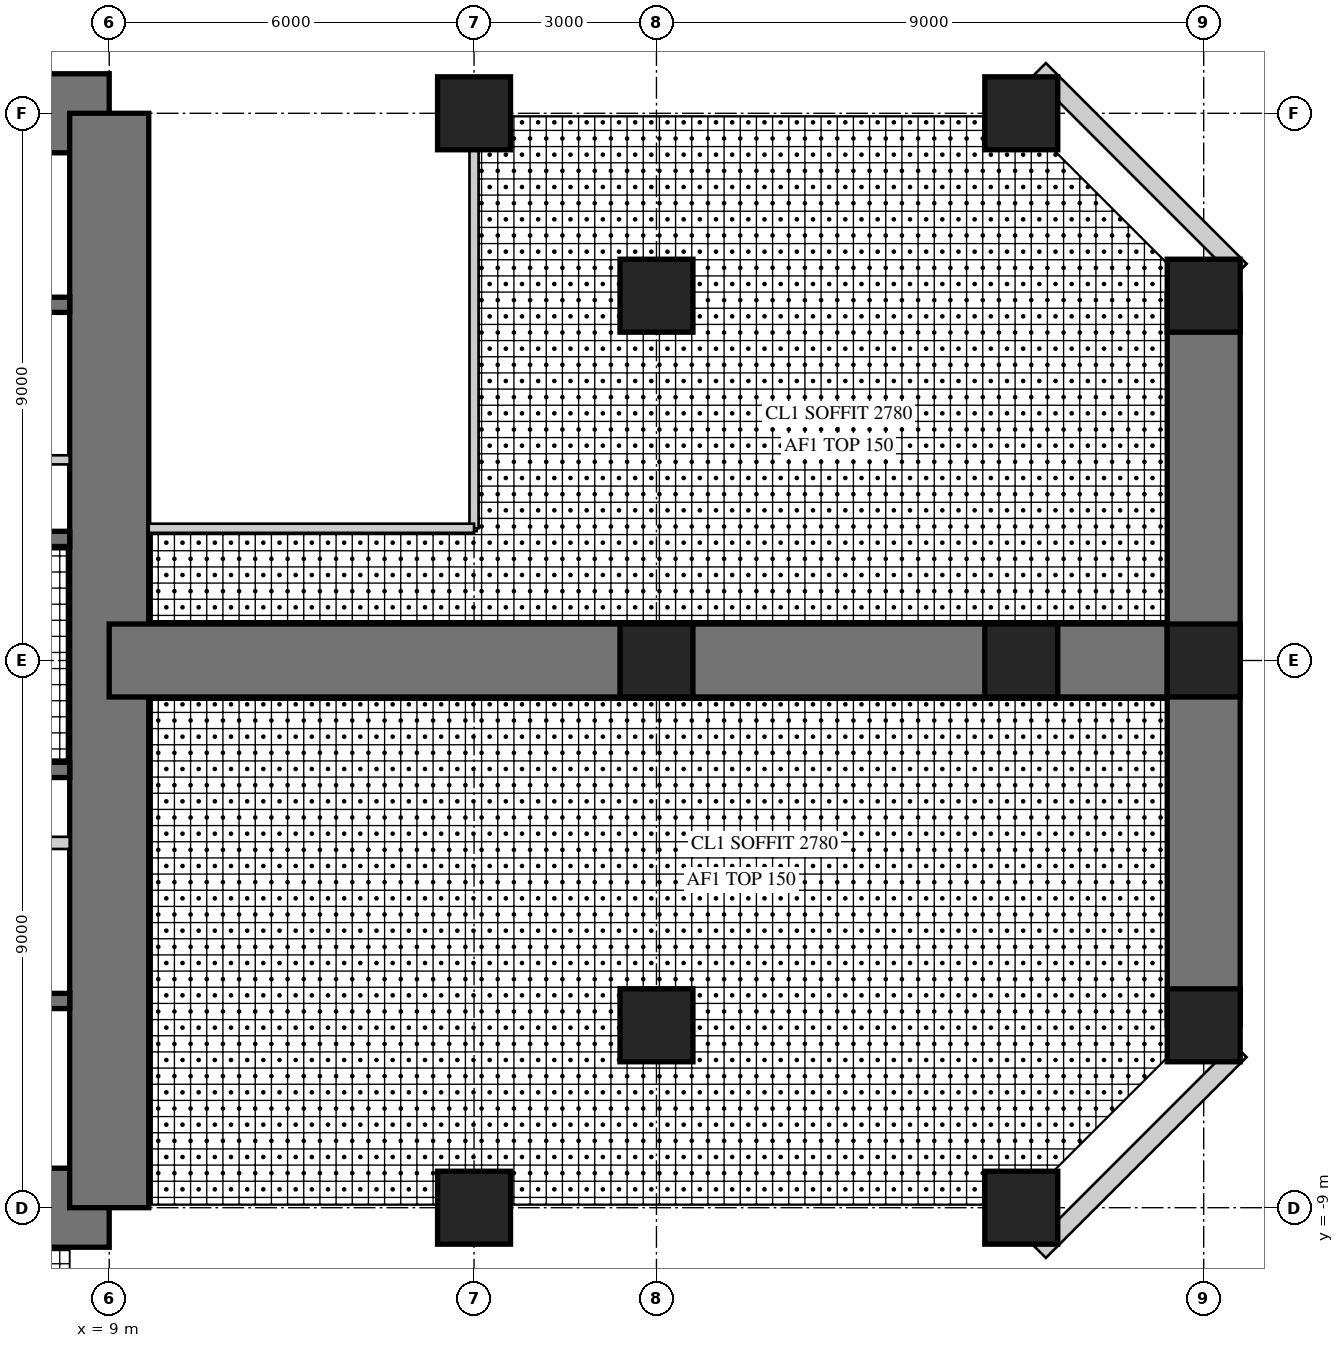
"""IFC4 building model, lengths in metres.
Left out: names, types, materials, properties, quantities, classifications, styles, units other than length and angle.
Written with IfcOpenShell. Run it as: python <this file> out.ifc"""

import sys

from ifc_helpers import new_model, si_unit, direction, frame, frame_2d, origin, origin_2d, place, context, subcontext, project, spatial, rectangle, hollow_rectangle, extrude, element, fill, save


model = new_model("IFC4")
c1 = context("Model", 3, precision=1e-05, world=origin(), true_north=direction((0.0, 1.0)))
c2 = subcontext(c1, "Body", "Model", "MODEL_VIEW")
j1 = project(units=[si_unit("LENGTHUNIT", "METRE"), si_unit("PLANEANGLEUNIT", "RADIAN")], contexts=[c1])
p1 = place(None, origin())
s1 = spatial("IfcSite", under=j1, at=p1, CompositionType="ELEMENT")
p2 = place(p1, origin())
s2 = spatial("IfcBuilding", under=s1, at=p2, CompositionType="ELEMENT")
p3 = place(p2, frame((0.0, 0.0, 71.5)))
s3 = spatial("IfcBuildingStorey", under=s2, at=p3, CompositionType="ELEMENT", Elevation=71.5)
p4 = place(p3, frame((9.0, 9.0, 0.0), z_axis=(0.0, 0.0, 1.0), x_axis=(-1.0, 0.0, 0.0)))
e1 = element("IfcWall", 1, at=p4, inside=s3, PredefinedType="SHEAR", context=c2, shape_type="SweptSolid", body=[
    extrude(rectangle(XDim=18.0, YDim=1.3, at=frame_2d((9.0, 0.0))), origin(), (0.0, 0.0, 1.0), 4.0),
])
p5 = place(p4, frame((9.8, 0.0, 0.0)))
e2 = element("IfcOpeningElement", 2, at=p5, cuts=e1, PredefinedType="OPENING", context=c2, shape_type="SweptSolid", body=[
    extrude(rectangle(XDim=1.0, YDim=2.4, at=frame_2d((0.5, 1.2))), frame((0.0, 0.66, 0.0), z_axis=(0.0, -1.0, 0.0), x_axis=(1.0, 0.0, 0.0)), (0.0, 0.0, 1.0), 1.32),
])
p6 = place(p3, frame((-9.0, -9.0, 0.0), z_axis=(0.0, 0.0, 1.0), x_axis=(1.0, 0.0, 0.0)))
e3 = element("IfcWall", 3, at=p6, inside=s3, PredefinedType="SHEAR", context=c2, shape_type="SweptSolid", body=[
    extrude(rectangle(XDim=18.0, YDim=1.3, at=frame_2d((9.0, 0.0))), origin(), (0.0, 0.0, 1.0), 4.0),
])
p7 = place(p6, frame((9.8, 0.0, 0.0)))
e4 = element("IfcOpeningElement", 4, at=p7, cuts=e3, PredefinedType="OPENING", context=c2, shape_type="SweptSolid", body=[
    extrude(rectangle(XDim=1.0, YDim=2.4, at=frame_2d((0.5, 1.2))), frame((0.0, 0.66, 0.0), z_axis=(0.0, -1.0, 0.0), x_axis=(1.0, 0.0, 0.0)), (0.0, 0.0, 1.0), 1.32),
])
p8 = place(p3, frame((9.0, -9.0, 0.0), z_axis=(0.0, 0.0, 1.0), x_axis=(0.0, 1.0, 0.0)))
e5 = element("IfcWall", 5, at=p8, inside=s3, PredefinedType="SHEAR", context=c2, shape_type="SweptSolid", body=[
    extrude(rectangle(XDim=18.0, YDim=1.3, at=frame_2d((9.0, 0.0))), origin(), (0.0, 0.0, 1.0), 4.0),
])
p9 = place(p8, frame((9.8, 0.0, 0.0)))
e6 = element("IfcOpeningElement", 6, at=p9, cuts=e5, PredefinedType="OPENING", context=c2, shape_type="SweptSolid", body=[
    extrude(rectangle(XDim=1.0, YDim=2.4, at=frame_2d((0.5, 1.2))), frame((0.0, 0.66, 0.0), z_axis=(0.0, -1.0, 0.0), x_axis=(1.0, 0.0, 0.0)), (0.0, 0.0, 1.0), 1.32),
])
p10 = place(p3, frame((1.925, 2.0, 0.0), z_axis=(0.0, 0.0, 1.0), x_axis=(1.0, 0.0, 0.0)))
e7 = element("IfcWall", 7, at=p10, inside=s3, PredefinedType="SHEAR", context=c2, shape_type="SweptSolid", body=[
    extrude(rectangle(XDim=6.425, YDim=0.25, at=frame_2d((3.212, 0.0))), origin(), (0.0, 0.0, 1.0), 4.0),
])
p11 = place(p3, frame((1.925, 5.85, 0.0), z_axis=(0.0, 0.0, 1.0), x_axis=(1.0, 0.0, 0.0)))
e8 = element("IfcWall", 8, at=p11, inside=s3, PredefinedType="SHEAR", context=c2, shape_type="SweptSolid", body=[
    extrude(rectangle(XDim=6.425, YDim=0.25, at=frame_2d((3.212, 0.0))), origin(), (0.0, 0.0, 1.0), 4.0),
])
p12 = place(p11, frame((0.454, 0.0, 0.0)))
e9 = element("IfcOpeningElement", 9, at=p12, cuts=e8, PredefinedType="OPENING", context=c2, shape_type="SweptSolid", body=[
    extrude(rectangle(XDim=1.1, YDim=2.2, at=frame_2d((0.55, 1.1))), frame((0.0, 0.135, 0.0), z_axis=(0.0, -1.0, 0.0), x_axis=(1.0, 0.0, 0.0)), (0.0, 0.0, 1.0), 0.27),
])
p13 = place(p11, frame((2.663, 0.0, 0.0)))
e10 = element("IfcOpeningElement", 10, at=p13, cuts=e8, PredefinedType="OPENING", context=c2, shape_type="SweptSolid", body=[
    extrude(rectangle(XDim=1.1, YDim=2.2, at=frame_2d((0.55, 1.1))), frame((0.0, 0.135, 0.0), z_axis=(0.0, -1.0, 0.0), x_axis=(1.0, 0.0, 0.0)), (0.0, 0.0, 1.0), 0.27),
])
p14 = place(p11, frame((4.871, 0.0, 0.0)))
e11 = element("IfcOpeningElement", 11, at=p14, cuts=e8, PredefinedType="OPENING", context=c2, shape_type="SweptSolid", body=[
    extrude(rectangle(XDim=1.1, YDim=2.2, at=frame_2d((0.55, 1.1))), frame((0.0, 0.135, 0.0), z_axis=(0.0, -1.0, 0.0), x_axis=(1.0, 0.0, 0.0)), (0.0, 0.0, 1.0), 0.27),
])
p15 = place(p3, frame((1.925, 3.3, 0.0), z_axis=(0.0, 0.0, 1.0), x_axis=(1.0, 0.0, 0.0)))
e12 = element("IfcWall", 12, at=p15, inside=s3, PredefinedType="PARTITIONING", context=c2, shape_type="SweptSolid", body=[
    extrude(rectangle(XDim=6.425, YDim=0.15, at=frame_2d((3.212, 0.0))), origin(), (0.0, 0.0, 1.0), 4.0),
])
p16 = place(p15, frame((0.075, 0.0, 0.0)))
e13 = element("IfcOpeningElement", 13, at=p16, cuts=e12, PredefinedType="OPENING", context=c2, shape_type="SweptSolid", body=[
    extrude(rectangle(XDim=0.8, YDim=2.1, at=frame_2d((0.4, 1.05))), frame((0.0, 0.085, 0.0), z_axis=(0.0, -1.0, 0.0), x_axis=(1.0, 0.0, 0.0)), (0.0, 0.0, 1.0), 0.17),
])
p17 = place(p15, frame((3.675, 0.0, 0.0)))
e14 = element("IfcOpeningElement", 14, at=p17, cuts=e12, PredefinedType="OPENING", context=c2, shape_type="SweptSolid", body=[
    extrude(rectangle(XDim=0.8, YDim=2.1, at=frame_2d((0.4, 1.05))), frame((0.0, 0.085, 0.0), z_axis=(0.0, -1.0, 0.0), x_axis=(1.0, 0.0, 0.0)), (0.0, 0.0, 1.0), 0.17),
])
p18 = place(p3, frame((2.125, -1.8, 0.0), z_axis=(0.0, 0.0, 1.0), x_axis=(1.0, 0.0, 0.0)))
e15 = element("IfcWall", 15, at=p18, inside=s3, PredefinedType="SHEAR", context=c2, shape_type="SweptSolid", body=[
    extrude(rectangle(XDim=6.225, YDim=0.25, at=frame_2d((3.113, 0.0))), origin(), (0.0, 0.0, 1.0), 4.0),
])
p19 = place(p3, frame((2.125, -5.6, 0.0), z_axis=(0.0, 0.0, 1.0), x_axis=(1.0, 0.0, 0.0)))
e16 = element("IfcWall", 16, at=p19, inside=s3, PredefinedType="SHEAR", context=c2, shape_type="SweptSolid", body=[
    extrude(rectangle(XDim=6.225, YDim=0.25, at=frame_2d((3.113, 0.0))), origin(), (0.0, 0.0, 1.0), 4.0),
])
p20 = place(p19, frame((0.175, 0.0, 0.0)))
e17 = element("IfcOpeningElement", 17, at=p20, cuts=e16, PredefinedType="OPENING", context=c2, shape_type="SweptSolid", body=[
    extrude(rectangle(XDim=1.0, YDim=2.1, at=frame_2d((0.5, 1.05))), frame((0.0, 0.135, 0.0), z_axis=(0.0, -1.0, 0.0), x_axis=(1.0, 0.0, 0.0)), (0.0, 0.0, 1.0), 0.27),
])
p21 = place(p3, frame((5.725, -3.0, 0.0), z_axis=(0.0, 0.0, 1.0), x_axis=(1.0, 0.0, 0.0)))
e18 = element("IfcWall", 18, at=p21, inside=s3, PredefinedType="PARTITIONING", context=c2, shape_type="SweptSolid", body=[
    extrude(rectangle(XDim=2.625, YDim=0.2, at=frame_2d((1.312, 0.0))), origin(), (0.0, 0.0, 1.0), 4.0),
])
p22 = place(p3, frame((9.0, 0.0, 0.0), z_axis=(0.0, 0.0, 1.0), x_axis=(1.0, 0.0, 0.0)))
e19 = element("IfcWall", 19, at=p22, inside=s3, PredefinedType="SHEAR", context=c2, shape_type="SweptSolid", body=[
    extrude(rectangle(XDim=18.0, YDim=1.2, at=frame_2d((9.0, 0.0))), origin(), (0.0, 0.0, 1.0), 4.0),
])
p23 = place(p22, frame((9.9, 0.0, 0.0)))
e20 = element("IfcOpeningElement", 20, at=p23, cuts=e19, PredefinedType="OPENING", context=c2, shape_type="SweptSolid", body=[
    extrude(rectangle(XDim=1.0, YDim=2.2, at=frame_2d((0.5, 1.1))), frame((0.0, 0.61, 0.0), z_axis=(0.0, -1.0, 0.0), x_axis=(1.0, 0.0, 0.0)), (0.0, 0.0, 1.0), 1.22),
])
p24 = place(p3, frame((27.0, -6.0, 0.0), z_axis=(0.0, 0.0, 1.0), x_axis=(0.0, 1.0, 0.0)))
e21 = element("IfcWall", 21, at=p24, inside=s3, PredefinedType="SHEAR", context=c2, shape_type="SweptSolid", body=[
    extrude(rectangle(XDim=12.0, YDim=1.2, at=frame_2d((6.0, 0.0))), origin(), (0.0, 0.0, 1.0), 4.0),
])
p25 = place(p24, frame((1.6, 0.0, 0.6)))
e22 = element("IfcOpeningElement", 22, at=p25, cuts=e21, PredefinedType="OPENING", context=c2, shape_type="SweptSolid", body=[
    extrude(rectangle(XDim=3.0, YDim=2.4, at=frame_2d((1.5, 1.2))), frame((0.0, 0.61, 0.0), z_axis=(0.0, -1.0, 0.0), x_axis=(1.0, 0.0, 0.0)), (0.0, 0.0, 1.0), 1.22),
])
p26 = place(p24, frame((7.4, 0.0, 0.6)))
e23 = element("IfcOpeningElement", 23, at=p26, cuts=e21, PredefinedType="OPENING", context=c2, shape_type="SweptSolid", body=[
    extrude(rectangle(XDim=3.0, YDim=2.4, at=frame_2d((1.5, 1.2))), frame((0.0, 0.61, 0.0), z_axis=(0.0, -1.0, 0.0), x_axis=(1.0, 0.0, 0.0)), (0.0, 0.0, 1.0), 1.22),
])
for number, where, z_axis, x_axis in (
    (24, (15.0, -9.0, 0.0), (0.0, 0.0, 1.0), (1.0, 0.0, 0.0)),
    (25, (24.0, -9.0, 0.0), (0.0, 0.0, 1.0), (1.0, 0.0, 0.0)),
    (26, (15.0, 9.0, 0.0), (0.0, 0.0, 1.0), (1.0, 0.0, 0.0)),
    (27, (24.0, 9.0, 0.0), (0.0, 0.0, 1.0), (1.0, 0.0, 0.0)),
    (28, (27.0, -6.0, 0.0), (0.0, 0.0, 1.0), (1.0, 0.0, 0.0)),
    (29, (27.0, 0.0, 0.0), (0.0, 0.0, 1.0), (1.0, 0.0, 0.0)),
    (30, (27.0, 6.0, 0.0), (0.0, 0.0, 1.0), (1.0, 0.0, 0.0)),
    (31, (18.0, -6.0, 0.0), (0.0, 0.0, 1.0), (1.0, 0.0, 0.0)),
    (32, (18.0, 0.0, 0.0), (0.0, 0.0, 1.0), (1.0, 0.0, 0.0)),
    (33, (18.0, 6.0, 0.0), (0.0, 0.0, 1.0), (1.0, 0.0, 0.0)),
    (34, (24.0, 0.0, 0.0), (0.0, 0.0, 1.0), (1.0, 0.0, 0.0)),
):
    element("IfcColumn", number, at=place(p3, frame(where, z_axis=z_axis, x_axis=x_axis)), inside=s3, PredefinedType="COLUMN", context=c2, shape_type="SweptSolid", body=[
        extrude(rectangle(XDim=1.2, YDim=1.2, at=origin_2d()), origin(), (0.0, 0.0, 1.0), 4.0),
    ])
p27 = place(p3, frame((24.298, -9.72, 0.0), z_axis=(0.0, 0.0, 1.0), x_axis=(0.707106781187, 0.707106781187, 0.0)))
e35 = element("IfcWall", 35, at=p27, inside=s3, PredefinedType="SOLIDWALL", context=c2, shape_type="SweptSolid", body=[
    extrude(rectangle(XDim=4.669, YDim=0.3, at=frame_2d((2.335, 0.0))), origin(), (0.0, 0.0, 1.0), 3.8),
])
p28 = place(p27, frame((1.885, 0.0, 0.3)))
e36 = element("IfcOpeningElement", 36, at=p28, cuts=e35, PredefinedType="OPENING", context=c2, shape_type="SweptSolid", body=[
    extrude(rectangle(XDim=0.9, YDim=2.4, at=frame_2d((0.45, 1.2))), frame((0.0, 0.16, 0.0), z_axis=(0.0, -1.0, 0.0), x_axis=(1.0, 0.0, 0.0)), (0.0, 0.0, 1.0), 0.32),
])
p29 = place(p3, frame((27.6, 6.418, 0.0), z_axis=(0.0, 0.0, 1.0), x_axis=(-0.707106781187, 0.707106781187, 0.0)))
e37 = element("IfcWall", 37, at=p29, inside=s3, PredefinedType="SOLIDWALL", context=c2, shape_type="SweptSolid", body=[
    extrude(rectangle(XDim=4.669, YDim=0.3, at=frame_2d((2.335, 0.0))), origin(), (0.0, 0.0, 1.0), 3.8),
])
p30 = place(p29, frame((1.885, 0.0, 0.3)))
e38 = element("IfcOpeningElement", 38, at=p30, cuts=e37, PredefinedType="OPENING", context=c2, shape_type="SweptSolid", body=[
    extrude(rectangle(XDim=0.9, YDim=2.4, at=frame_2d((0.45, 1.2))), frame((0.0, 0.16, 0.0), z_axis=(0.0, -1.0, 0.0), x_axis=(1.0, 0.0, 0.0)), (0.0, 0.0, 1.0), 0.32),
])
p31 = place(p3, frame((15.0, 2.175, 0.0), z_axis=(0.0, 0.0, 1.0), x_axis=(0.0, 1.0, 0.0)))
e39 = element("IfcWall", 39, at=p31, inside=s3, PredefinedType="PARTITIONING", context=c2, shape_type="SweptSolid", body=[
    extrude(rectangle(XDim=6.225, YDim=0.15, at=frame_2d((3.112, 0.0))), origin(), (0.0, 0.0, 1.0), 2.95),
])
p32 = place(p31, frame((2.613, 0.0, 0.0)))
e40 = element("IfcOpeningElement", 40, at=p32, cuts=e39, PredefinedType="OPENING", context=c2, shape_type="SweptSolid", body=[
    extrude(rectangle(XDim=1.0, YDim=2.1, at=frame_2d((0.5, 1.05))), frame((0.0, 0.085, 0.0), z_axis=(0.0, -1.0, 0.0), x_axis=(1.0, 0.0, 0.0)), (0.0, 0.0, 1.0), 0.17),
])
p33 = place(p3, frame((9.65, 2.175, 0.0), z_axis=(0.0, 0.0, 1.0), x_axis=(1.0, 0.0, 0.0)))
e41 = element("IfcWall", 41, at=p33, inside=s3, PredefinedType="PARTITIONING", context=c2, shape_type="SweptSolid", body=[
    extrude(rectangle(XDim=5.35, YDim=0.15, at=frame_2d((2.675, 0.0))), origin(), (0.0, 0.0, 1.0), 3.8),
])
p34 = place(p28, origin())
e42 = element("IfcWindow", 42, at=p34, inside=s3, PartitioningType="SINGLE_PANEL", PredefinedType="WINDOW", context=c2, shape_type="SweptSolid", body=[
    extrude(hollow_rectangle(XDim=0.9, YDim=2.4, WallThickness=0.06, at=frame_2d((0.45, 1.2))), frame((0.0, 0.03, 0.0), z_axis=(0.0, -1.0, 0.0), x_axis=(1.0, 0.0, 0.0)), (0.0, 0.0, 1.0), 0.06),
    extrude(rectangle(XDim=0.779, YDim=2.279, at=frame_2d((0.45, 1.2))), frame((0.0, 0.03, 0.0), z_axis=(0.0, -1.0, 0.0), x_axis=(1.0, 0.0, 0.0)), (0.0, 0.0, 1.0), 0.06),
])
fill(e36, e42)
p35 = place(p25, origin())
e43 = element("IfcWindow", 43, at=p35, inside=s3, PartitioningType="SINGLE_PANEL", PredefinedType="WINDOW", context=c2, shape_type="SweptSolid", body=[
    extrude(hollow_rectangle(XDim=3.0, YDim=2.4, WallThickness=0.06, at=frame_2d((1.5, 1.2))), frame((0.0, 0.03, 0.0), z_axis=(0.0, -1.0, 0.0), x_axis=(1.0, 0.0, 0.0)), (0.0, 0.0, 1.0), 0.06),
    extrude(rectangle(XDim=2.879, YDim=2.279, at=frame_2d((1.5, 1.2))), frame((0.0, 0.03, 0.0), z_axis=(0.0, -1.0, 0.0), x_axis=(1.0, 0.0, 0.0)), (0.0, 0.0, 1.0), 0.06),
])
fill(e22, e43)
p36 = place(p26, origin())
e44 = element("IfcWindow", 44, at=p36, inside=s3, PartitioningType="SINGLE_PANEL", PredefinedType="WINDOW", context=c2, shape_type="SweptSolid", body=[
    extrude(hollow_rectangle(XDim=3.0, YDim=2.4, WallThickness=0.06, at=frame_2d((1.5, 1.2))), frame((0.0, 0.03, 0.0), z_axis=(0.0, -1.0, 0.0), x_axis=(1.0, 0.0, 0.0)), (0.0, 0.0, 1.0), 0.06),
    extrude(rectangle(XDim=2.879, YDim=2.279, at=frame_2d((1.5, 1.2))), frame((0.0, 0.03, 0.0), z_axis=(0.0, -1.0, 0.0), x_axis=(1.0, 0.0, 0.0)), (0.0, 0.0, 1.0), 0.06),
])
fill(e23, e44)
p37 = place(p30, origin())
e45 = element("IfcWindow", 45, at=p37, inside=s3, PartitioningType="SINGLE_PANEL", PredefinedType="WINDOW", context=c2, shape_type="SweptSolid", body=[
    extrude(hollow_rectangle(XDim=0.9, YDim=2.4, WallThickness=0.06, at=frame_2d((0.45, 1.2))), frame((0.0, 0.03, 0.0), z_axis=(0.0, -1.0, 0.0), x_axis=(1.0, 0.0, 0.0)), (0.0, 0.0, 1.0), 0.06),
    extrude(rectangle(XDim=0.779, YDim=2.279, at=frame_2d((0.45, 1.2))), frame((0.0, 0.03, 0.0), z_axis=(0.0, -1.0, 0.0), x_axis=(1.0, 0.0, 0.0)), (0.0, 0.0, 1.0), 0.06),
])
fill(e38, e45)
p38 = place(p32, origin())
e46 = element("IfcDoor", 46, at=p38, inside=s3, OperationType="SINGLE_SWING_LEFT", PredefinedType="DOOR", context=c2, shape_type="SweptSolid", body=[
    extrude(rectangle(XDim=1.0, YDim=2.1, at=frame_2d((0.5, 1.05))), frame((0.0, 0.025, 0.0), z_axis=(0.0, -1.0, 0.0), x_axis=(1.0, 0.0, 0.0)), (0.0, 0.0, 1.0), 0.05),
])
fill(e40, e46)
p39 = place(p23, origin())
e47 = element("IfcDoor", 47, at=p39, inside=s3, OperationType="SINGLE_SWING_RIGHT", PredefinedType="DOOR", context=c2, shape_type="SweptSolid", body=[
    extrude(rectangle(XDim=1.0, YDim=2.2, at=frame_2d((0.5, 1.1))), frame((0.0, 0.025, 0.0), z_axis=(0.0, -1.0, 0.0), x_axis=(1.0, 0.0, 0.0)), (0.0, 0.0, 1.0), 0.05),
])
fill(e20, e47)
p40 = place(p9, frame((1.0, 0.0, 0.0), z_axis=(0.0, 0.0, 1.0), x_axis=(-1.0, 0.0, 0.0)))
e48 = element("IfcDoor", 48, at=p40, inside=s3, OperationType="SINGLE_SWING_RIGHT", PredefinedType="DOOR", context=c2, shape_type="SweptSolid", body=[
    extrude(rectangle(XDim=1.0, YDim=2.4, at=frame_2d((0.5, 1.2))), frame((0.0, -0.005, 0.0), z_axis=(0.0, -1.0, 0.0), x_axis=(1.0, 0.0, 0.0)), (0.0, 0.0, 1.0), 0.05),
])
fill(e6, e48)
save(model, sys.argv[1])
